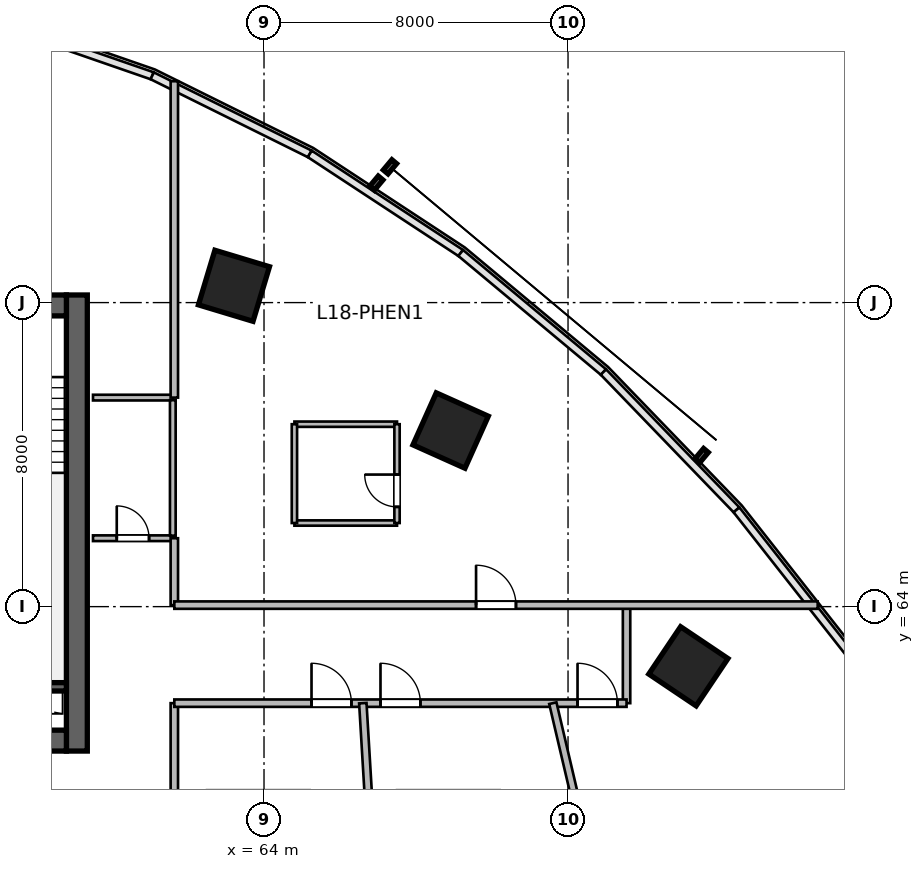
"""IFC4 building model, lengths in metres.
Left out: names, types, materials, properties, quantities, classifications, styles, units other than length and angle.
Written with IfcOpenShell. Run it as: python <this file> out.ifc"""

import sys

from ifc_helpers import new_model, si_unit, direction, frame, frame_2d, origin, origin_2d, place, context, subcontext, project, spatial, rectangle, extrude, source, transform, mapped, element, fill, save


model = new_model("IFC4")
c1 = context("Model", 3, precision=1e-05, world=origin(), true_north=direction((0.0, 1.0)))
c2 = subcontext(c1, "Body", "Model", "MODEL_VIEW")
j1 = project(units=[si_unit("LENGTHUNIT", "METRE"), si_unit("PLANEANGLEUNIT", "RADIAN")], contexts=[c1])
p1 = place(None, origin())
s1 = spatial("IfcSite", under=j1, at=p1, CompositionType="ELEMENT")
p2 = place(p1, origin())
s2 = spatial("IfcBuilding", under=s1, at=p2, CompositionType="ELEMENT")
p3 = place(p2, frame((0.0, 0.0, 78.6)))
s3 = spatial("IfcBuildingStorey", under=s2, at=p3, CompositionType="ELEMENT", Elevation=78.6)
m1 = source(origin(), c2, "Body", "SweptSolid", [
    extrude(rectangle(XDim=12.0, YDim=0.55, at=frame_2d((6.0, 0.0))), origin(), (0.0, 0.0, 1.0), 3.6),
])
p4 = place(p3, frame((59.075, 60.2, 0.0), z_axis=(0.0, 0.0, 1.0), x_axis=(0.0, 1.0, 0.0)))
e1 = element("IfcWall", 1, at=p4, inside=s3, PredefinedType="SHEAR", context=c2, shape_type="MappedRepresentation", body=[
    mapped(m1, transform((0.0, 0.0, 0.0), scale=1.0)),
])
m2 = source(origin(), c2, "Body", "SweptSolid", [
    extrude(rectangle(XDim=21.6, YDim=0.55, at=frame_2d((10.8, 0.0))), origin(), (0.0, 0.0, 1.0), 3.6),
])
p5 = place(p3, frame((37.2, 60.475, 0.0), z_axis=(0.0, 0.0, 1.0), x_axis=(1.0, 0.0, 0.0)))
e2 = element("IfcWall", 2, at=p5, inside=s3, PredefinedType="SHEAR", context=c2, shape_type="MappedRepresentation", body=[
    mapped(m2, transform((0.0, 0.0, 0.0), scale=1.0)),
])
p6 = place(p5, frame((1.1, 0.0, 0.0)))
e3 = element("IfcOpeningElement", 3, at=p6, cuts=e2, PredefinedType="OPENING", context=c2, shape_type="SweptSolid", body=[
    extrude(rectangle(XDim=1.15, YDim=2.15, at=frame_2d((0.575, 1.075))), frame((0.0, 0.285, 0.0), z_axis=(0.0, -1.0, 0.0), x_axis=(1.0, 0.0, 0.0)), (0.0, 0.0, 1.0), 0.57),
])
p7 = place(p5, frame((19.5, 0.0, 0.0)))
e4 = element("IfcOpeningElement", 4, at=p7, cuts=e2, PredefinedType="OPENING", context=c2, shape_type="SweptSolid", body=[
    extrude(rectangle(XDim=0.9, YDim=2.1, at=frame_2d((0.45, 1.05))), frame((0.0, 0.285, 0.0), z_axis=(0.0, -1.0, 0.0), x_axis=(1.0, 0.0, 0.0)), (0.0, 0.0, 1.0), 0.57),
])
p8 = place(p5, frame((12.02, 0.0, 0.0)))
e5 = element("IfcOpeningElement", 5, at=p8, cuts=e2, PredefinedType="OPENING", context=c2, shape_type="SweptSolid", body=[
    extrude(rectangle(XDim=1.6, YDim=2.15, at=frame_2d((0.8, 1.075))), frame((0.0, 0.285, 0.0), z_axis=(0.0, -1.0, 0.0), x_axis=(1.0, 0.0, 0.0)), (0.0, 0.0, 1.0), 0.57),
])
p9 = place(p3, frame((37.2, 71.925, 0.0), z_axis=(0.0, 0.0, 1.0), x_axis=(1.0, 0.0, 0.0)))
e6 = element("IfcWall", 6, at=p9, inside=s3, PredefinedType="SHEAR", context=c2, shape_type="MappedRepresentation", body=[
    mapped(m2, transform((0.0, 0.0, 0.0), scale=1.0)),
])
p10 = place(p9, frame((1.2, 0.0, 0.0)))
e7 = element("IfcOpeningElement", 7, at=p10, cuts=e6, PredefinedType="OPENING", context=c2, shape_type="SweptSolid", body=[
    extrude(rectangle(XDim=0.9, YDim=2.1, at=frame_2d((0.45, 1.05))), frame((0.0, 0.285, 0.0), z_axis=(0.0, -1.0, 0.0), x_axis=(1.0, 0.0, 0.0)), (0.0, 0.0, 1.0), 0.57),
])
p11 = place(p9, frame((14.7, 0.0, 0.0)))
e8 = element("IfcOpeningElement", 8, at=p11, cuts=e6, PredefinedType="OPENING", context=c2, shape_type="SweptSolid", body=[
    extrude(rectangle(XDim=1.2, YDim=2.15, at=frame_2d((0.6, 1.075))), frame((0.0, 0.285, 0.0), z_axis=(0.0, -1.0, 0.0), x_axis=(1.0, 0.0, 0.0)), (0.0, 0.0, 1.0), 0.57),
])
p12 = place(p9, frame((4.15, 0.0, 0.0)))
e9 = element("IfcOpeningElement", 9, at=p12, cuts=e6, PredefinedType="OPENING", context=c2, shape_type="SweptSolid", body=[
    extrude(rectangle(XDim=1.3, YDim=2.15, at=frame_2d((0.65, 1.075))), frame((0.0, 0.285, 0.0), z_axis=(0.0, -1.0, 0.0), x_axis=(1.0, 0.0, 0.0)), (0.0, 0.0, 1.0), 0.57),
])
p13 = place(p9, frame((6.76, 0.0, 0.0)))
e10 = element("IfcOpeningElement", 10, at=p13, cuts=e6, PredefinedType="OPENING", context=c2, shape_type="SweptSolid", body=[
    extrude(rectangle(XDim=0.85, YDim=2.1, at=frame_2d((0.425, 1.05))), frame((0.0, 0.285, 0.0), z_axis=(0.0, -1.0, 0.0), x_axis=(1.0, 0.0, 0.0)), (0.0, 0.0, 1.0), 0.57),
])
p14 = place(p9, frame((8.76, 0.0, 0.0)))
e11 = element("IfcOpeningElement", 11, at=p14, cuts=e6, PredefinedType="OPENING", context=c2, shape_type="SweptSolid", body=[
    extrude(rectangle(XDim=0.85, YDim=2.1, at=frame_2d((0.425, 1.05))), frame((0.0, 0.285, 0.0), z_axis=(0.0, -1.0, 0.0), x_axis=(1.0, 0.0, 0.0)), (0.0, 0.0, 1.0), 0.57),
])
p15 = place(p9, frame((10.725, 0.0, 0.0)))
e12 = element("IfcOpeningElement", 12, at=p15, cuts=e6, PredefinedType="OPENING", context=c2, shape_type="SweptSolid", body=[
    extrude(rectangle(XDim=0.85, YDim=2.1, at=frame_2d((0.425, 1.05))), frame((0.0, 0.285, 0.0), z_axis=(0.0, -1.0, 0.0), x_axis=(1.0, 0.0, 0.0)), (0.0, 0.0, 1.0), 0.57),
])
m3 = source(origin(), c2, "Body", "SweptSolid", [
    extrude(rectangle(XDim=3.27, YDim=0.22, at=frame_2d((1.635, 0.0))), origin(), (0.0, 0.0, 1.0), 3.6),
])
p16 = place(p3, frame((55.53, 61.89, 0.0), z_axis=(0.0, 0.0, 1.0), x_axis=(1.0, 0.0, 0.0)))
e13 = element("IfcWall", 13, at=p16, inside=s3, PredefinedType="SHEAR", context=c2, shape_type="MappedRepresentation", body=[
    mapped(m3, transform((0.0, 0.0, 0.0), scale=1.0)),
])
m4 = source(origin(), c2, "Body", "SweptSolid", [
    extrude(rectangle(XDim=1.5, YDim=1.5, at=origin_2d()), origin(), (0.0, 0.0, 1.0), 3.6),
])
for number, where, z_axis, x_axis in (
    (14, (63.209, 72.442, 0.0), (0.0, 0.0, 1.0), (0.289, 0.957, 0.0)),
    (15, (68.91, 68.633, 0.0), (0.0, 0.0, 1.0), (0.409, 0.912, 0.0)),
    (16, (75.167, 62.43, 0.0), (0.0, 0.0, 1.0), (0.558, 0.83, 0.0)),
):
    element("IfcColumn", number, at=place(p3, frame(where, z_axis=z_axis, x_axis=x_axis)), inside=s3, PredefinedType="COLUMN", context=c2, shape_type="MappedRepresentation", body=[
        mapped(m4, transform((0.0, 0.0, 0.0), scale=1.0)),
    ])
m5 = source(origin(), c2, "Body", "SweptSolid", [
    extrude(rectangle(XDim=2.1, YDim=0.15, at=frame_2d((1.05, 0.0))), origin(), (0.0, 0.0, 1.0), 3.36),
])
p17 = place(p3, frame((59.5, 65.8, 0.0), z_axis=(0.0, 0.0, 1.0), x_axis=(1.0, 0.0, 0.0)))
e17 = element("IfcWall", 17, at=p17, inside=s3, PredefinedType="PARTITIONING", context=c2, shape_type="MappedRepresentation", body=[
    mapped(m5, transform((0.0, 0.0, 0.0), scale=1.0)),
])
p18 = place(p17, frame((0.625, 0.0, 0.0)))
e18 = element("IfcOpeningElement", 18, at=p18, cuts=e17, PredefinedType="OPENING", context=c2, shape_type="SweptSolid", body=[
    extrude(rectangle(XDim=0.85, YDim=2.1, at=frame_2d((0.425, 1.05))), frame((0.0, 0.085, 0.0), z_axis=(0.0, -1.0, 0.0), x_axis=(1.0, 0.0, 0.0)), (0.0, 0.0, 1.0), 0.17),
])
p19 = place(p3, frame((59.5, 69.5, 0.0), z_axis=(0.0, 0.0, 1.0), x_axis=(1.0, 0.0, 0.0)))
e19 = element("IfcWall", 19, at=p19, inside=s3, PredefinedType="PARTITIONING", context=c2, shape_type="MappedRepresentation", body=[
    mapped(m5, transform((0.0, 0.0, 0.0), scale=1.0)),
])
m6 = source(origin(), c2, "Body", "SweptSolid", [
    extrude(rectangle(XDim=3.565, YDim=0.15, at=frame_2d((1.783, 0.0))), origin(), (0.0, 0.0, 1.0), 3.36),
])
p20 = place(p3, frame((61.6, 65.867, 0.0), z_axis=(0.0, 0.0, 1.0), x_axis=(0.0, 1.0, 0.0)))
e20 = element("IfcWall", 20, at=p20, inside=s3, PredefinedType="PARTITIONING", context=c2, shape_type="MappedRepresentation", body=[
    mapped(m6, transform((0.0, 0.0, 0.0), scale=1.0)),
])
m7 = source(origin(), c2, "Body", "SweptSolid", [
    extrude(rectangle(XDim=2.58, YDim=0.195, at=frame_2d((1.29, 0.0))), origin(), (0.0, 0.0, 1.0), 2.88),
])
p21 = place(p3, frame((73.54, 61.46, 0.0), z_axis=(0.0, 0.0, 1.0), x_axis=(0.0, 1.0, 0.0)))
e21 = element("IfcWall", 21, at=p21, inside=s3, PredefinedType="PARTITIONING", context=c2, shape_type="MappedRepresentation", body=[
    mapped(m7, transform((0.0, 0.0, 0.0), scale=1.0)),
])
m8 = source(origin(), c2, "Body", "SweptSolid", [
    extrude(rectangle(XDim=1.76, YDim=0.195, at=frame_2d((0.88, 0.0))), origin(), (0.0, 0.0, 1.0), 3.36),
])
p22 = place(p3, frame((61.64, 64.04, 0.0), z_axis=(0.0, 0.0, 1.0), x_axis=(0.0, 1.0, 0.0)))
e22 = element("IfcWall", 22, at=p22, inside=s3, PredefinedType="PARTITIONING", context=c2, shape_type="MappedRepresentation", body=[
    mapped(m8, transform((0.0, 0.0, 0.0), scale=1.0)),
])
m9 = source(origin(), c2, "Body", "SweptSolid", [
    extrude(rectangle(XDim=8.324, YDim=0.195, at=frame_2d((4.162, 0.0))), origin(), (0.0, 0.0, 1.0), 3.36),
])
p23 = place(p3, frame((61.64, 69.5, 0.0), z_axis=(0.0, 0.0, 1.0), x_axis=(0.0, 1.0, 0.0)))
e23 = element("IfcWall", 23, at=p23, inside=s3, PredefinedType="PARTITIONING", context=c2, shape_type="MappedRepresentation", body=[
    mapped(m9, transform((0.0, 0.0, 0.0), scale=1.0)),
])
m10 = source(origin(), c2, "Body", "SweptSolid", [
    extrude(rectangle(XDim=16.134, YDim=0.195, at=frame_2d((8.067, 0.0))), origin(), (0.0, 0.0, 1.0), 2.644),
])
p24 = place(p3, frame((61.64, 45.326, 0.0), z_axis=(0.0, 0.0, 1.0), x_axis=(0.0, 1.0, 0.0)))
e24 = element("IfcWall", 24, at=p24, inside=s3, PredefinedType="PARTITIONING", context=c2, shape_type="MappedRepresentation", body=[
    mapped(m10, transform((0.0, 0.0, 0.0), scale=1.0)),
])
m11 = source(origin(), c2, "Body", "SweptSolid", [
    extrude(rectangle(XDim=16.93, YDim=0.195, at=frame_2d((8.465, 0.0))), origin(), (0.0, 0.0, 1.0), 3.36),
])
p25 = place(p3, frame((61.64, 64.04, 0.0), z_axis=(0.0, 0.0, 1.0), x_axis=(1.0, 0.0, 0.0)))
e25 = element("IfcWall", 25, at=p25, inside=s3, PredefinedType="PARTITIONING", context=c2, shape_type="MappedRepresentation", body=[
    mapped(m11, transform((0.0, 0.0, 0.0), scale=1.0)),
])
p26 = place(p25, frame((7.94, 0.0, 0.0)))
e26 = element("IfcOpeningElement", 26, at=p26, cuts=e25, PredefinedType="OPENING", context=c2, shape_type="SweptSolid", body=[
    extrude(rectangle(XDim=1.05, YDim=2.15, at=frame_2d((0.525, 1.075))), frame((0.0, 0.107, 0.0), z_axis=(0.0, -1.0, 0.0), x_axis=(1.0, 0.0, 0.0)), (0.0, 0.0, 1.0), 0.215),
])
m12 = source(origin(), c2, "Body", "SweptSolid", [
    extrude(rectangle(XDim=11.9, YDim=0.195, at=frame_2d((5.95, 0.0))), origin(), (0.0, 0.0, 1.0), 3.36),
])
p27 = place(p3, frame((61.64, 61.46, 0.0), z_axis=(0.0, 0.0, 1.0), x_axis=(1.0, 0.0, 0.0)))
e27 = element("IfcWall", 27, at=p27, inside=s3, PredefinedType="PARTITIONING", context=c2, shape_type="MappedRepresentation", body=[
    mapped(m12, transform((0.0, 0.0, 0.0), scale=1.0)),
])
p28 = place(p27, frame((3.61, 0.0, 0.0)))
e28 = element("IfcOpeningElement", 28, at=p28, cuts=e27, PredefinedType="OPENING", context=c2, shape_type="SweptSolid", body=[
    extrude(rectangle(XDim=1.05, YDim=2.15, at=frame_2d((0.525, 1.075))), frame((0.0, 0.107, 0.0), z_axis=(0.0, -1.0, 0.0), x_axis=(1.0, 0.0, 0.0)), (0.0, 0.0, 1.0), 0.215),
])
p29 = place(p27, frame((5.425, 0.0, 0.0)))
e29 = element("IfcOpeningElement", 29, at=p29, cuts=e27, PredefinedType="OPENING", context=c2, shape_type="SweptSolid", body=[
    extrude(rectangle(XDim=1.05, YDim=2.15, at=frame_2d((0.525, 1.075))), frame((0.0, 0.107, 0.0), z_axis=(0.0, -1.0, 0.0), x_axis=(1.0, 0.0, 0.0)), (0.0, 0.0, 1.0), 0.215),
])
p30 = place(p27, frame((10.61, 0.0, 0.0)))
e30 = element("IfcOpeningElement", 30, at=p30, cuts=e27, PredefinedType="OPENING", context=c2, shape_type="SweptSolid", body=[
    extrude(rectangle(XDim=1.05, YDim=2.15, at=frame_2d((0.525, 1.075))), frame((0.0, 0.107, 0.0), z_axis=(0.0, -1.0, 0.0), x_axis=(1.0, 0.0, 0.0)), (0.0, 0.0, 1.0), 0.215),
])
m13 = source(origin(), c2, "Body", "SweptSolid", [
    extrude(rectangle(XDim=24.889, YDim=0.195, at=frame_2d((12.444, 0.0))), origin(), (0.0, 0.0, 1.0), 2.644),
])
p31 = place(p3, frame((68.086, 36.616, 0.0), z_axis=(0.0, 0.0, 1.0), x_axis=(-0.059709317989, 0.998215807, 0.0)))
e31 = element("IfcWall", 31, at=p31, inside=s3, PredefinedType="PARTITIONING", context=c2, shape_type="MappedRepresentation", body=[
    mapped(m13, transform((0.0, 0.0, 0.0), scale=1.0)),
])
m14 = source(origin(), c2, "Body", "SweptSolid", [
    extrude(rectangle(XDim=26.387, YDim=0.195, at=frame_2d((13.194, 0.0))), origin(), (0.0, 0.0, 1.0), 2.88),
])
p32 = place(p3, frame((77.629, 35.771, 0.0), z_axis=(0.0, 0.0, 1.0), x_axis=(-0.228490600532, 0.97354611882, 0.0)))
e32 = element("IfcWall", 32, at=p32, inside=s3, PredefinedType="PARTITIONING", context=c2, shape_type="MappedRepresentation", body=[
    mapped(m14, transform((0.0, 0.0, 0.0), scale=1.0)),
])
m15 = source(origin(), c2, "Body", "SweptSolid", [
    extrude(rectangle(XDim=2.7, YDim=0.14, at=frame_2d((1.35, 0.0))), origin(), (0.0, 0.0, 1.0), 3.36),
])
for number, where, z_axis, x_axis in (
    (33, (64.8, 68.8, 0.0), (0.0, 0.0, 1.0), (1.0, 0.0, 0.0)),
    (34, (64.8, 66.2, 0.0), (0.0, 0.0, 1.0), (1.0, 0.0, 0.0)),
):
    element("IfcWall", number, at=place(p3, frame(where, z_axis=z_axis, x_axis=x_axis)), inside=s3, PredefinedType="PARTITIONING", context=c2, shape_type="MappedRepresentation", body=[
        mapped(m15, transform((0.0, 0.0, 0.0), scale=1.0)),
    ])
m16 = source(origin(), c2, "Body", "SweptSolid", [
    extrude(rectangle(XDim=2.6, YDim=0.14, at=frame_2d((1.3, 0.0))), origin(), (0.0, 0.0, 1.0), 3.36),
])
p33 = place(p3, frame((64.8, 66.2, 0.0), z_axis=(0.0, 0.0, 1.0), x_axis=(0.0, 1.0, 0.0)))
e35 = element("IfcWall", 35, at=p33, inside=s3, PredefinedType="PARTITIONING", context=c2, shape_type="MappedRepresentation", body=[
    mapped(m16, transform((0.0, 0.0, 0.0), scale=1.0)),
])
p34 = place(p3, frame((67.5, 66.2, 0.0), z_axis=(0.0, 0.0, 1.0), x_axis=(0.0, 1.0, 0.0)))
e36 = element("IfcWall", 36, at=p34, inside=s3, PredefinedType="PARTITIONING", context=c2, shape_type="MappedRepresentation", body=[
    mapped(m16, transform((0.0, 0.0, 0.0), scale=1.0)),
])
p35 = place(p34, frame((0.425, 0.0, 0.0)))
e37 = element("IfcOpeningElement", 37, at=p35, cuts=e36, PredefinedType="OPENING", context=c2, shape_type="SweptSolid", body=[
    extrude(rectangle(XDim=0.85, YDim=2.05, at=frame_2d((0.425, 1.025))), frame((0.0, 0.08, 0.0), z_axis=(0.0, -1.0, 0.0), x_axis=(1.0, 0.0, 0.0)), (0.0, 0.0, 1.0), 0.16),
])
m17 = source(origin(), c2, "Body", "SweptSolid", [
    extrude(rectangle(XDim=0.85, YDim=2.1, at=frame_2d((0.425, 1.05))), frame((0.0, 0.025, 0.0), z_axis=(0.0, -1.0, 0.0), x_axis=(1.0, 0.0, 0.0)), (0.0, 0.0, 1.0), 0.05),
])
p36 = place(p18, origin())
e38 = element("IfcDoor", 38, at=p36, inside=s3, OperationType="SINGLE_SWING_LEFT", PredefinedType="DOOR", context=c2, shape_type="MappedRepresentation", body=[
    mapped(m17, transform((0.0, 0.0, 0.0), scale=1.0)),
])
fill(e18, e38)
m18 = source(origin(), c2, "Body", "SweptSolid", [
    extrude(rectangle(XDim=1.05, YDim=2.15, at=frame_2d((0.525, 1.075))), frame((0.0, 0.025, 0.0), z_axis=(0.0, -1.0, 0.0), x_axis=(1.0, 0.0, 0.0)), (0.0, 0.0, 1.0), 0.05),
])
p37 = place(p26, origin())
e39 = element("IfcDoor", 39, at=p37, inside=s3, OperationType="SINGLE_SWING_LEFT", PredefinedType="DOOR", context=c2, shape_type="MappedRepresentation", body=[
    mapped(m18, transform((0.0, 0.0, 0.0), scale=1.0)),
])
fill(e26, e39)
m19 = source(origin(), c2, "Body", "SweptSolid", [
    extrude(rectangle(XDim=0.85, YDim=2.05, at=frame_2d((0.425, 1.025))), frame((0.0, 0.025, 0.0), z_axis=(0.0, -1.0, 0.0), x_axis=(1.0, 0.0, 0.0)), (0.0, 0.0, 1.0), 0.05),
])
p38 = place(p35, origin())
e40 = element("IfcDoor", 40, at=p38, inside=s3, OperationType="SINGLE_SWING_RIGHT", PredefinedType="DOOR", context=c2, shape_type="MappedRepresentation", body=[
    mapped(m19, transform((0.0, 0.0, 0.0), scale=1.0)),
])
fill(e37, e40)
p39 = place(p28, origin())
e41 = element("IfcDoor", 41, at=p39, inside=s3, OperationType="SINGLE_SWING_LEFT", PredefinedType="DOOR", context=c2, shape_type="MappedRepresentation", body=[
    mapped(m18, transform((0.0, 0.0, 0.0), scale=1.0)),
])
fill(e28, e41)
p40 = place(p29, origin())
e42 = element("IfcDoor", 42, at=p40, inside=s3, OperationType="SINGLE_SWING_LEFT", PredefinedType="DOOR", context=c2, shape_type="MappedRepresentation", body=[
    mapped(m18, transform((0.0, 0.0, 0.0), scale=1.0)),
])
fill(e29, e42)
p41 = place(p30, origin())
e43 = element("IfcDoor", 43, at=p41, inside=s3, OperationType="SINGLE_SWING_LEFT", PredefinedType="DOOR", context=c2, shape_type="MappedRepresentation", body=[
    mapped(m18, transform((0.0, 0.0, 0.0), scale=1.0)),
])
fill(e30, e43)
save(model, sys.argv[1])
